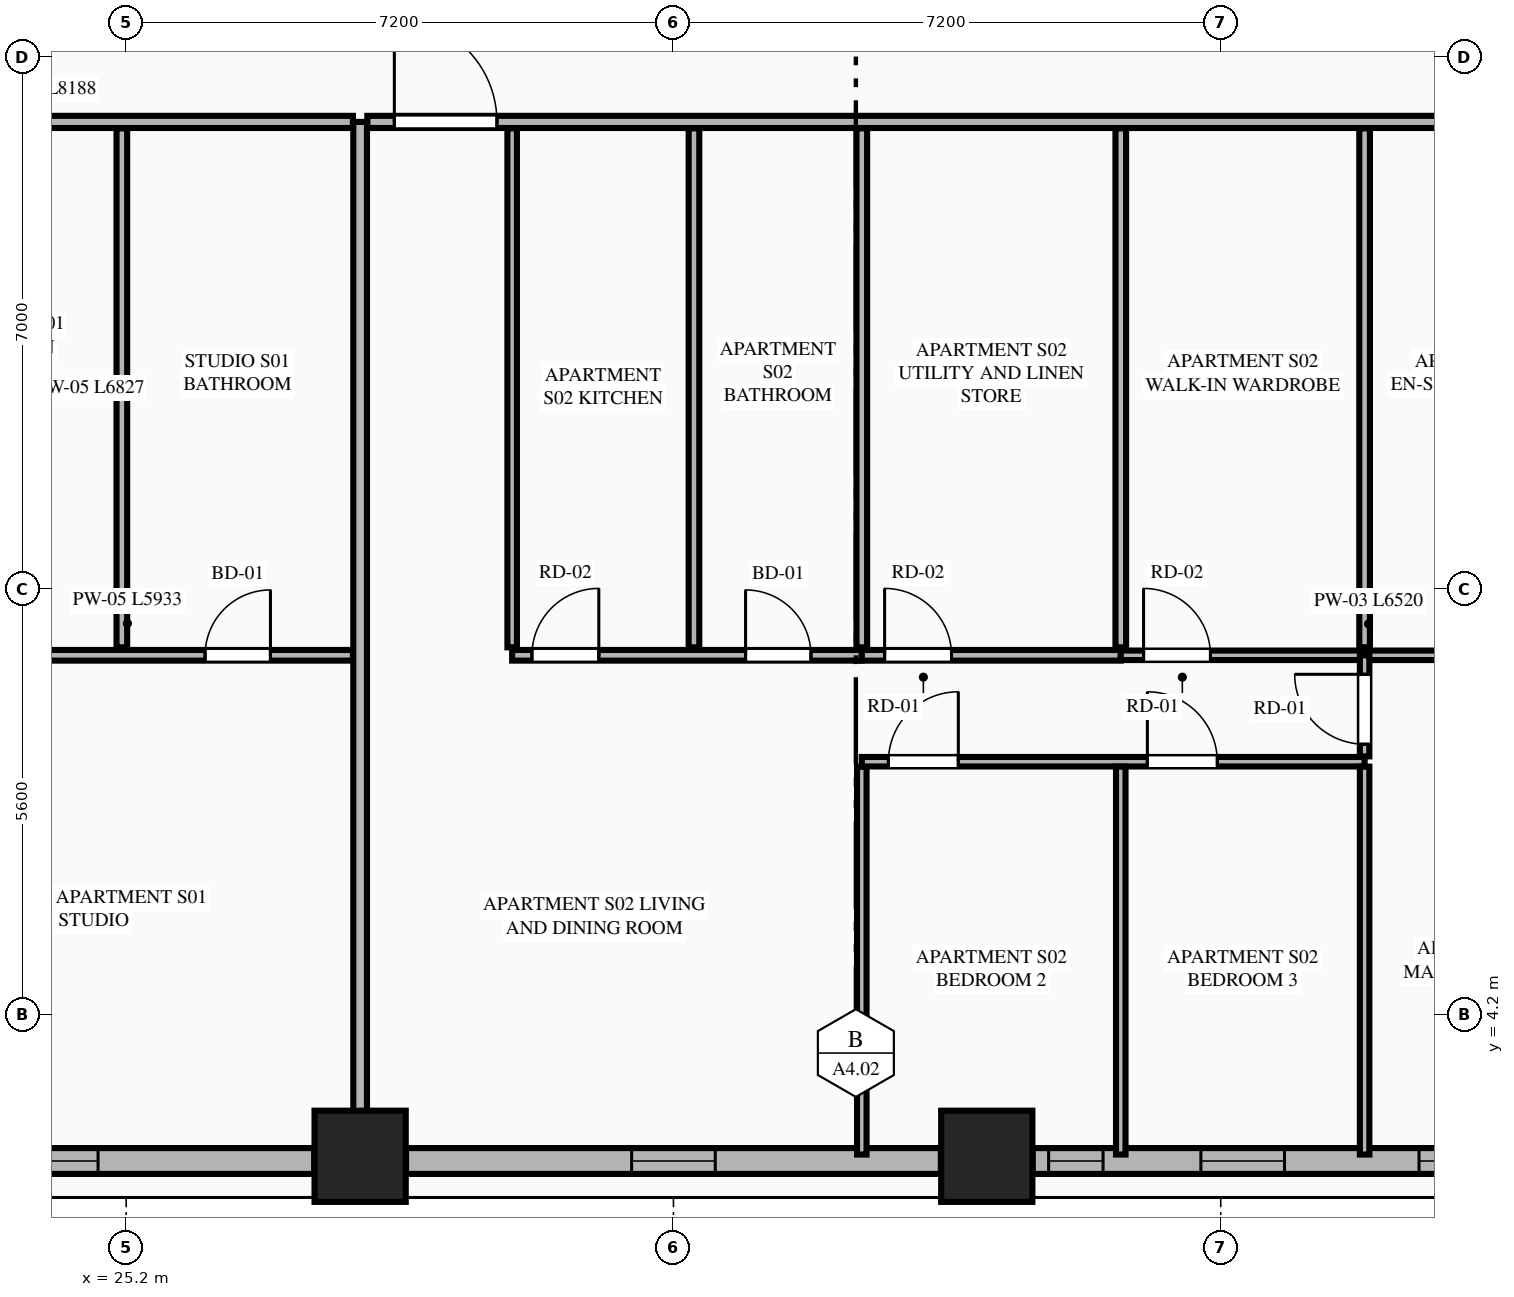
"""IFC4 building model, lengths in metres.
Left out: names, types, materials, properties, quantities, classifications, styles, units other than length and angle.
Written with IfcOpenShell. Run it as: python <this file> out.ifc"""

import sys

from ifc_helpers import new_model, si_unit, direction, frame, frame_2d, origin, origin_2d, place, context, subcontext, project, spatial, rectangle, extrude, element, fill, save


model = new_model("IFC4")
c1 = context("Model", 3, precision=1e-05, world=origin(), true_north=direction((0.0, 1.0)))
c2 = subcontext(c1, "Body", "Model", "MODEL_VIEW")
j1 = project(units=[si_unit("LENGTHUNIT", "METRE"), si_unit("PLANEANGLEUNIT", "RADIAN")], contexts=[c1])
p1 = place(None, origin())
s1 = spatial("IfcSite", under=j1, at=p1, CompositionType="ELEMENT")
p2 = place(p1, origin())
s2 = spatial("IfcBuilding", under=s1, at=p2, CompositionType="ELEMENT")
p3 = place(p2, frame((0.0, 0.0, 35.55)))
s3 = spatial("IfcBuildingStorey", under=s2, at=p3, CompositionType="ELEMENT", Elevation=35.55)
for number, where, z_axis, x_axis in (
    (1, (28.278, 2.342, 0.0), (0.0, 0.0, 1.0), (1.0, 0.0, 0.0)),
    (2, (36.522, 2.342, 0.0), (0.0, 0.0, 1.0), (1.0, 0.0, 0.0)),
):
    element("IfcColumn", number, at=place(p3, frame(where, z_axis=z_axis, x_axis=x_axis)), inside=s3, PredefinedType="COLUMN", context=c2, shape_type="SweptSolid", body=[
        extrude(rectangle(XDim=1.2, YDim=1.2, at=origin_2d()), origin(), (0.0, 0.0, 1.0), 3.55),
    ])
p4 = place(p3, frame((20.887, 2.28, 0.0), z_axis=(0.0, 0.0, 1.0), x_axis=(1.0, 0.0, 0.0)))
e3 = element("IfcWall", 3, at=p4, inside=s3, PredefinedType="STANDARD", context=c2, shape_type="SweptSolid", body=[
    extrude(rectangle(XDim=6.787, YDim=0.34, at=frame_2d((3.394, 0.0))), origin(), (0.0, 0.0, 1.0), 2.787),
])
p5 = place(p4, frame((2.843, 0.0, 0.75)))
e4 = element("IfcOpeningElement", 4, at=p5, cuts=e3, PredefinedType="OPENING", context=c2, shape_type="SweptSolid", body=[
    extrude(rectangle(XDim=1.1, YDim=1.887, at=frame_2d((0.55, 0.943))), frame((0.0, 0.18, 0.0), z_axis=(0.0, -1.0, 0.0), x_axis=(1.0, 0.0, 0.0)), (0.0, 0.0, 1.0), 0.36),
])
p6 = place(p3, frame((28.882, 2.28, 0.0), z_axis=(0.0, 0.0, 1.0), x_axis=(1.0, 0.0, 0.0)))
e5 = element("IfcWall", 5, at=p6, inside=s3, PredefinedType="STANDARD", context=c2, shape_type="SweptSolid", body=[
    extrude(rectangle(XDim=7.036, YDim=0.34, at=frame_2d((3.518, 0.0))), origin(), (0.0, 0.0, 1.0), 2.787),
])
p7 = place(p6, frame((2.968, 0.0, 0.75)))
e6 = element("IfcOpeningElement", 6, at=p7, cuts=e5, PredefinedType="OPENING", context=c2, shape_type="SweptSolid", body=[
    extrude(rectangle(XDim=1.1, YDim=1.887, at=frame_2d((0.55, 0.943))), frame((0.0, 0.18, 0.0), z_axis=(0.0, -1.0, 0.0), x_axis=(1.0, 0.0, 0.0)), (0.0, 0.0, 1.0), 0.36),
])
p8 = place(p3, frame((37.126, 2.28, 0.0), z_axis=(0.0, 0.0, 1.0), x_axis=(1.0, 0.0, 0.0)))
e7 = element("IfcWall", 7, at=p8, inside=s3, PredefinedType="STANDARD", context=c2, shape_type="SweptSolid", body=[
    extrude(rectangle(XDim=6.787, YDim=0.34, at=frame_2d((3.394, 0.0))), origin(), (0.0, 0.0, 1.0), 2.787),
])
p9 = place(p8, frame((2.213, 0.0, 0.75)))
e8 = element("IfcOpeningElement", 8, at=p9, cuts=e7, PredefinedType="OPENING", context=c2, shape_type="SweptSolid", body=[
    extrude(rectangle(XDim=1.1, YDim=1.887, at=frame_2d((0.55, 0.943))), frame((0.0, 0.18, 0.0), z_axis=(0.0, -1.0, 0.0), x_axis=(1.0, 0.0, 0.0)), (0.0, 0.0, 1.0), 0.36),
])
p10 = place(p8, frame((5.083, 0.0, 0.75)))
e9 = element("IfcOpeningElement", 9, at=p10, cuts=e7, PredefinedType="OPENING", context=c2, shape_type="SweptSolid", body=[
    extrude(rectangle(XDim=1.1, YDim=1.887, at=frame_2d((0.55, 0.943))), frame((0.0, 0.18, 0.0), z_axis=(0.0, -1.0, 0.0), x_axis=(1.0, 0.0, 0.0)), (0.0, 0.0, 1.0), 0.36),
])
p11 = place(p8, frame((0.21, 0.0, 0.75)))
e10 = element("IfcOpeningElement", 10, at=p11, cuts=e7, PredefinedType="OPENING", context=c2, shape_type="SweptSolid", body=[
    extrude(rectangle(XDim=0.716, YDim=1.887, at=frame_2d((0.358, 0.943))), frame((0.0, 0.18, 0.0), z_axis=(0.0, -1.0, 0.0), x_axis=(1.0, 0.0, 0.0)), (0.0, 0.0, 1.0), 0.36),
])
p12 = place(p3, frame((28.278, 2.455, 0.0), z_axis=(0.0, 0.0, 1.0), x_axis=(0.0, 1.0, 0.0)))
e11 = element("IfcWall", 11, at=p12, inside=s3, PredefinedType="PARTITIONING", context=c2, shape_type="SweptSolid", body=[
    extrude(rectangle(XDim=13.495, YDim=0.18, at=frame_2d((6.748, 0.0))), origin(), (0.0, 0.0, 1.0), 2.7),
])
p13 = place(p3, frame((19.995, 15.95, 0.0), z_axis=(0.0, 0.0, 1.0), x_axis=(1.0, 0.0, 0.0)))
e12 = element("IfcWall", 12, at=p13, inside=s3, PredefinedType="PARTITIONING", context=c2, shape_type="SweptSolid", body=[
    extrude(rectangle(XDim=8.188, YDim=0.16, at=frame_2d((4.094, 0.0))), origin(), (0.0, 0.0, 1.0), 3.33),
])
p14 = place(p13, frame((0.705, 0.0, 0.0)))
e13 = element("IfcOpeningElement", 13, at=p14, cuts=e12, PredefinedType="OPENING", context=c2, shape_type="SweptSolid", body=[
    extrude(rectangle(XDim=1.02, YDim=2.25, at=frame_2d((0.51, 1.125))), frame((0.0, 0.09, 0.0), z_axis=(0.0, -1.0, 0.0), x_axis=(1.0, 0.0, 0.0)), (0.0, 0.0, 1.0), 0.18),
])
p15 = place(p3, frame((22.25, 8.933, 0.0), z_axis=(0.0, 0.0, 1.0), x_axis=(1.0, 0.0, 0.0)))
e14 = element("IfcWall", 14, at=p15, inside=s3, PredefinedType="PLUMBINGWALL", context=c2, shape_type="SweptSolid", body=[
    extrude(rectangle(XDim=5.933, YDim=0.14, at=frame_2d((2.967, 0.0))), origin(), (0.0, 0.0, 1.0), 3.33),
])
p16 = place(p15, frame((3.988, 0.0, 0.0)))
e15 = element("IfcOpeningElement", 15, at=p16, cuts=e14, PredefinedType="OPENING", context=c2, shape_type="SweptSolid", body=[
    extrude(rectangle(XDim=0.86, YDim=2.1, at=frame_2d((0.43, 1.05))), frame((0.0, 0.08, 0.0), z_axis=(0.0, -1.0, 0.0), x_axis=(1.0, 0.0, 0.0)), (0.0, 0.0, 1.0), 0.16),
])
p17 = place(p15, frame((0.22, 0.0, 0.0)))
e16 = element("IfcOpeningElement", 16, at=p17, cuts=e14, PredefinedType="OPENING", context=c2, shape_type="SweptSolid", body=[
    extrude(rectangle(XDim=0.88, YDim=2.15, at=frame_2d((0.44, 1.075))), frame((0.0, 0.08, 0.0), z_axis=(0.0, -1.0, 0.0), x_axis=(1.0, 0.0, 0.0)), (0.0, 0.0, 1.0), 0.16),
])
p18 = place(p3, frame((25.143, 9.038, 0.0), z_axis=(0.0, 0.0, 1.0), x_axis=(0.0, 1.0, 0.0)))
e17 = element("IfcWall", 17, at=p18, inside=s3, PredefinedType="PLUMBINGWALL", context=c2, shape_type="SweptSolid", body=[
    extrude(rectangle(XDim=6.827, YDim=0.14, at=frame_2d((3.414, 0.0))), origin(), (0.0, 0.0, 1.0), 3.33),
])
p19 = place(p3, frame((28.373, 15.95, 0.0), z_axis=(0.0, 0.0, 1.0), x_axis=(1.0, 0.0, 0.0)))
e18 = element("IfcWall", 18, at=p19, inside=s3, PredefinedType="PARTITIONING", context=c2, shape_type="SweptSolid", body=[
    extrude(rectangle(XDim=16.432, YDim=0.16, at=frame_2d((8.216, 0.0))), origin(), (0.0, 0.0, 1.0), 3.33),
])
p20 = place(p19, frame((0.355, 0.0, 0.0)))
e19 = element("IfcOpeningElement", 19, at=p20, cuts=e18, PredefinedType="OPENING", context=c2, shape_type="SweptSolid", body=[
    extrude(rectangle(XDim=1.35, YDim=2.35, at=frame_2d((0.675, 1.175))), frame((0.0, 0.09, 0.0), z_axis=(0.0, -1.0, 0.0), x_axis=(1.0, 0.0, 0.0)), (0.0, 0.0, 1.0), 0.18),
])
p21 = place(p3, frame((30.278, 9.038, 0.0), z_axis=(0.0, 0.0, 1.0), x_axis=(0.0, 1.0, 0.0)))
e20 = element("IfcWall", 20, at=p21, inside=s3, PredefinedType="PARTITIONING", context=c2, shape_type="SweptSolid", body=[
    extrude(rectangle(XDim=6.827, YDim=0.125, at=frame_2d((3.414, 0.0))), origin(), (0.0, 0.0, 1.0), 3.33),
])
p22 = place(p3, frame((30.278, 8.933, 0.0), z_axis=(0.0, 0.0, 1.0), x_axis=(1.0, 0.0, 0.0)))
e21 = element("IfcWall", 21, at=p22, inside=s3, PredefinedType="PLUMBINGWALL", context=c2, shape_type="SweptSolid", body=[
    extrude(rectangle(XDim=4.6, YDim=0.14, at=frame_2d((2.3, 0.0))), origin(), (0.0, 0.0, 1.0), 3.33),
])
p23 = place(p22, frame((3.071, 0.0, 0.0)))
e22 = element("IfcOpeningElement", 22, at=p23, cuts=e21, PredefinedType="OPENING", context=c2, shape_type="SweptSolid", body=[
    extrude(rectangle(XDim=0.86, YDim=2.1, at=frame_2d((0.43, 1.05))), frame((0.0, 0.08, 0.0), z_axis=(0.0, -1.0, 0.0), x_axis=(1.0, 0.0, 0.0)), (0.0, 0.0, 1.0), 0.16),
])
p24 = place(p22, frame((0.26, 0.0, 0.0)))
e23 = element("IfcOpeningElement", 23, at=p24, cuts=e21, PredefinedType="OPENING", context=c2, shape_type="SweptSolid", body=[
    extrude(rectangle(XDim=0.88, YDim=2.15, at=frame_2d((0.44, 1.075))), frame((0.0, 0.08, 0.0), z_axis=(0.0, -1.0, 0.0), x_axis=(1.0, 0.0, 0.0)), (0.0, 0.0, 1.0), 0.16),
])
p25 = place(p3, frame((34.878, 8.933, 0.0), z_axis=(0.0, 0.0, 1.0), x_axis=(1.0, 0.0, 0.0)))
e24 = element("IfcWall", 24, at=p25, inside=s3, PredefinedType="PLUMBINGWALL", context=c2, shape_type="SweptSolid", body=[
    extrude(rectangle(XDim=3.407, YDim=0.14, at=frame_2d((1.704, 0.0))), origin(), (0.0, 0.0, 1.0), 3.33),
])
p26 = place(p25, frame((0.3, 0.0, 0.0)))
e25 = element("IfcOpeningElement", 25, at=p26, cuts=e24, PredefinedType="OPENING", context=c2, shape_type="SweptSolid", body=[
    extrude(rectangle(XDim=0.88, YDim=2.15, at=frame_2d((0.44, 1.075))), frame((0.0, 0.08, 0.0), z_axis=(0.0, -1.0, 0.0), x_axis=(1.0, 0.0, 0.0)), (0.0, 0.0, 1.0), 0.16),
])
p27 = place(p3, frame((38.285, 8.933, 0.0), z_axis=(0.0, 0.0, 1.0), x_axis=(1.0, 0.0, 0.0)))
e26 = element("IfcWall", 26, at=p27, inside=s3, PredefinedType="PARTITIONING", context=c2, shape_type="SweptSolid", body=[
    extrude(rectangle(XDim=6.52, YDim=0.125, at=frame_2d((3.26, 0.0))), origin(), (0.0, 0.0, 1.0), 3.33),
])
p28 = place(p27, frame((4.439, 0.0, 0.0)))
e27 = element("IfcOpeningElement", 27, at=p28, cuts=e26, PredefinedType="OPENING", context=c2, shape_type="SweptSolid", body=[
    extrude(rectangle(XDim=0.86, YDim=2.1, at=frame_2d((0.43, 1.05))), frame((0.0, 0.073, 0.0), z_axis=(0.0, -1.0, 0.0), x_axis=(1.0, 0.0, 0.0)), (0.0, 0.0, 1.0), 0.145),
])
p29 = place(p27, frame((0.3, 0.0, 0.0)))
e28 = element("IfcOpeningElement", 28, at=p29, cuts=e26, PredefinedType="OPENING", context=c2, shape_type="SweptSolid", body=[
    extrude(rectangle(XDim=0.88, YDim=2.15, at=frame_2d((0.44, 1.075))), frame((0.0, 0.073, 0.0), z_axis=(0.0, -1.0, 0.0), x_axis=(1.0, 0.0, 0.0)), (0.0, 0.0, 1.0), 0.145),
])
p30 = place(p3, frame((32.67, 9.038, 0.0), z_axis=(0.0, 0.0, 1.0), x_axis=(0.0, 1.0, 0.0)))
e29 = element("IfcWall", 29, at=p30, inside=s3, PredefinedType="PLUMBINGWALL", context=c2, shape_type="SweptSolid", body=[
    extrude(rectangle(XDim=6.827, YDim=0.14, at=frame_2d((3.414, 0.0))), origin(), (0.0, 0.0, 1.0), 3.33),
])
p31 = place(p3, frame((34.878, 2.365, 0.0), z_axis=(0.0, 0.0, 1.0), x_axis=(0.0, 1.0, 0.0)))
e30 = element("IfcWall", 30, at=p31, inside=s3, PredefinedType="PARTITIONING", context=c2, shape_type="SweptSolid", body=[
    extrude(rectangle(XDim=5.103, YDim=0.125, at=frame_2d((2.552, 0.0))), origin(), (0.0, 0.0, 1.0), 3.33),
])
p32 = place(p3, frame((34.878, 7.533, 0.0), z_axis=(0.0, 0.0, 1.0), x_axis=(1.0, 0.0, 0.0)))
e31 = element("IfcWall", 31, at=p32, inside=s3, PredefinedType="PARTITIONING", context=c2, shape_type="SweptSolid", body=[
    extrude(rectangle(XDim=6.615, YDim=0.125, at=frame_2d((3.308, 0.0))), origin(), (0.0, 0.0, 1.0), 3.33),
])
p33 = place(p32, frame((0.35, 0.0, 0.0)))
e32 = element("IfcOpeningElement", 32, at=p33, cuts=e31, PredefinedType="OPENING", context=c2, shape_type="SweptSolid", body=[
    extrude(rectangle(XDim=0.92, YDim=2.15, at=frame_2d((0.46, 1.075))), frame((0.0, 0.073, 0.0), z_axis=(0.0, -1.0, 0.0), x_axis=(1.0, 0.0, 0.0)), (0.0, 0.0, 1.0), 0.145),
])
p34 = place(p32, frame((3.757, 0.0, 0.0)))
e33 = element("IfcOpeningElement", 33, at=p34, cuts=e31, PredefinedType="OPENING", context=c2, shape_type="SweptSolid", body=[
    extrude(rectangle(XDim=0.92, YDim=2.15, at=frame_2d((0.46, 1.075))), frame((0.0, 0.073, 0.0), z_axis=(0.0, -1.0, 0.0), x_axis=(1.0, 0.0, 0.0)), (0.0, 0.0, 1.0), 0.145),
])
p35 = place(p3, frame((41.493, 7.603, 0.0), z_axis=(0.0, 0.0, 1.0), x_axis=(0.0, 1.0, 0.0)))
e34 = element("IfcWall", 34, at=p35, inside=s3, PredefinedType="PARTITIONING", context=c2, shape_type="SweptSolid", body=[
    extrude(rectangle(XDim=1.33, YDim=0.125, at=frame_2d((0.665, 0.0))), origin(), (0.0, 0.0, 1.0), 3.33),
])
p36 = place(p35, frame((0.16, 0.0, 0.0)))
e35 = element("IfcOpeningElement", 35, at=p36, cuts=e34, PredefinedType="OPENING", context=c2, shape_type="SweptSolid", body=[
    extrude(rectangle(XDim=0.92, YDim=2.15, at=frame_2d((0.46, 1.075))), frame((0.0, 0.073, 0.0), z_axis=(0.0, -1.0, 0.0), x_axis=(1.0, 0.0, 0.0)), (0.0, 0.0, 1.0), 0.145),
])
for number, where, z_axis, x_axis in (
    (36, (34.878, 9.038, 0.0), (0.0, 0.0, 1.0), (0.0, 1.0, 0.0)),
    (37, (38.285, 9.038, 0.0), (0.0, 0.0, 1.0), (0.0, 1.0, 0.0)),
):
    element("IfcWall", number, at=place(p3, frame(where, z_axis=z_axis, x_axis=x_axis)), inside=s3, PredefinedType="PLUMBINGWALL", context=c2, shape_type="SweptSolid", body=[
        extrude(rectangle(XDim=6.827, YDim=0.14, at=frame_2d((3.414, 0.0))), origin(), (0.0, 0.0, 1.0), 3.33),
    ])
for number, where, z_axis, x_axis in (
    (38, (38.285, 2.365, 0.0), (0.0, 0.0, 1.0), (0.0, 1.0, 0.0)),
    (39, (41.493, 2.365, 0.0), (0.0, 0.0, 1.0), (0.0, 1.0, 0.0)),
):
    element("IfcWall", number, at=place(p3, frame(where, z_axis=z_axis, x_axis=x_axis)), inside=s3, PredefinedType="PARTITIONING", context=c2, shape_type="SweptSolid", body=[
        extrude(rectangle(XDim=5.103, YDim=0.125, at=frame_2d((2.552, 0.0))), origin(), (0.0, 0.0, 1.0), 3.33),
    ])
p37 = place(p3, frame((41.493, 9.038, 0.0), z_axis=(0.0, 0.0, 1.0), x_axis=(0.0, 1.0, 0.0)))
e40 = element("IfcWall", 40, at=p37, inside=s3, PredefinedType="PLUMBINGWALL", context=c2, shape_type="SweptSolid", body=[
    extrude(rectangle(XDim=6.827, YDim=0.14, at=frame_2d((3.414, 0.0))), origin(), (0.0, 0.0, 1.0), 3.33),
])
p38 = place(p5, origin())
e41 = element("IfcWindow", 41, at=p38, inside=s3, PartitioningType="SINGLE_PANEL", PredefinedType="WINDOW", context=c2, shape_type="SweptSolid", body=[
    extrude(rectangle(XDim=1.1, YDim=1.887, at=frame_2d((0.55, 0.943))), frame((0.0, 0.03, 0.0), z_axis=(0.0, -1.0, 0.0), x_axis=(1.0, 0.0, 0.0)), (0.0, 0.0, 1.0), 0.06),
])
fill(e4, e41)
p39 = place(p7, origin())
e42 = element("IfcWindow", 42, at=p39, inside=s3, PartitioningType="SINGLE_PANEL", PredefinedType="WINDOW", context=c2, shape_type="SweptSolid", body=[
    extrude(rectangle(XDim=1.1, YDim=1.887, at=frame_2d((0.55, 0.943))), frame((0.0, 0.03, 0.0), z_axis=(0.0, -1.0, 0.0), x_axis=(1.0, 0.0, 0.0)), (0.0, 0.0, 1.0), 0.06),
])
fill(e6, e42)
p40 = place(p9, origin())
e43 = element("IfcWindow", 43, at=p40, inside=s3, PartitioningType="SINGLE_PANEL", PredefinedType="WINDOW", context=c2, shape_type="SweptSolid", body=[
    extrude(rectangle(XDim=1.1, YDim=1.887, at=frame_2d((0.55, 0.943))), frame((0.0, 0.03, 0.0), z_axis=(0.0, -1.0, 0.0), x_axis=(1.0, 0.0, 0.0)), (0.0, 0.0, 1.0), 0.06),
])
fill(e8, e43)
p41 = place(p16, origin())
e44 = element("IfcDoor", 44, at=p41, inside=s3, OperationType="SINGLE_SWING_RIGHT", PredefinedType="DOOR", context=c2, shape_type="SweptSolid", body=[
    extrude(rectangle(XDim=0.86, YDim=2.1, at=frame_2d((0.43, 1.05))), frame((0.0, 0.025, 0.0), z_axis=(0.0, -1.0, 0.0), x_axis=(1.0, 0.0, 0.0)), (0.0, 0.0, 1.0), 0.05),
])
fill(e15, e44)
p42 = place(p23, origin())
e45 = element("IfcDoor", 45, at=p42, inside=s3, OperationType="SINGLE_SWING_LEFT", PredefinedType="DOOR", context=c2, shape_type="SweptSolid", body=[
    extrude(rectangle(XDim=0.86, YDim=2.1, at=frame_2d((0.43, 1.05))), frame((0.0, 0.025, 0.0), z_axis=(0.0, -1.0, 0.0), x_axis=(1.0, 0.0, 0.0)), (0.0, 0.0, 1.0), 0.05),
])
fill(e22, e45)
p43 = place(p20, origin())
e46 = element("IfcDoor", 46, at=p43, inside=s3, OperationType="SINGLE_SWING_LEFT", PredefinedType="DOOR", context=c2, shape_type="SweptSolid", body=[
    extrude(rectangle(XDim=1.35, YDim=2.35, at=frame_2d((0.675, 1.175))), frame((0.0, 0.025, 0.0), z_axis=(0.0, -1.0, 0.0), x_axis=(1.0, 0.0, 0.0)), (0.0, 0.0, 1.0), 0.05),
])
fill(e19, e46)
p44 = place(p24, origin())
e47 = element("IfcDoor", 47, at=p44, inside=s3, OperationType="SINGLE_SWING_RIGHT", PredefinedType="DOOR", context=c2, shape_type="SweptSolid", body=[
    extrude(rectangle(XDim=0.88, YDim=2.15, at=frame_2d((0.44, 1.075))), frame((0.0, 0.025, 0.0), z_axis=(0.0, -1.0, 0.0), x_axis=(1.0, 0.0, 0.0)), (0.0, 0.0, 1.0), 0.05),
])
fill(e23, e47)
p45 = place(p26, origin())
e48 = element("IfcDoor", 48, at=p45, inside=s3, OperationType="SINGLE_SWING_LEFT", PredefinedType="DOOR", context=c2, shape_type="SweptSolid", body=[
    extrude(rectangle(XDim=0.88, YDim=2.15, at=frame_2d((0.44, 1.075))), frame((0.0, 0.025, 0.0), z_axis=(0.0, -1.0, 0.0), x_axis=(1.0, 0.0, 0.0)), (0.0, 0.0, 1.0), 0.05),
])
fill(e25, e48)
p46 = place(p33, origin())
e49 = element("IfcDoor", 49, at=p46, inside=s3, OperationType="SINGLE_SWING_RIGHT", PredefinedType="DOOR", context=c2, shape_type="SweptSolid", body=[
    extrude(rectangle(XDim=0.92, YDim=2.15, at=frame_2d((0.46, 1.075))), frame((0.0, 0.025, 0.0), z_axis=(0.0, -1.0, 0.0), x_axis=(1.0, 0.0, 0.0)), (0.0, 0.0, 1.0), 0.05),
])
fill(e32, e49)
p47 = place(p34, origin())
e50 = element("IfcDoor", 50, at=p47, inside=s3, OperationType="SINGLE_SWING_LEFT", PredefinedType="DOOR", context=c2, shape_type="SweptSolid", body=[
    extrude(rectangle(XDim=0.92, YDim=2.15, at=frame_2d((0.46, 1.075))), frame((0.0, 0.025, 0.0), z_axis=(0.0, -1.0, 0.0), x_axis=(1.0, 0.0, 0.0)), (0.0, 0.0, 1.0), 0.05),
])
fill(e33, e50)
p48 = place(p36, origin())
e51 = element("IfcDoor", 51, at=p48, inside=s3, OperationType="SINGLE_SWING_RIGHT", PredefinedType="DOOR", context=c2, shape_type="SweptSolid", body=[
    extrude(rectangle(XDim=0.92, YDim=2.15, at=frame_2d((0.46, 1.075))), frame((0.0, 0.025, 0.0), z_axis=(0.0, -1.0, 0.0), x_axis=(1.0, 0.0, 0.0)), (0.0, 0.0, 1.0), 0.05),
])
fill(e35, e51)
p49 = place(p29, origin())
e52 = element("IfcDoor", 52, at=p49, inside=s3, OperationType="SINGLE_SWING_LEFT", PredefinedType="DOOR", context=c2, shape_type="SweptSolid", body=[
    extrude(rectangle(XDim=0.88, YDim=2.15, at=frame_2d((0.44, 1.075))), frame((0.0, 0.025, 0.0), z_axis=(0.0, -1.0, 0.0), x_axis=(1.0, 0.0, 0.0)), (0.0, 0.0, 1.0), 0.05),
])
fill(e28, e52)
p50 = place(p10, origin())
e53 = element("IfcWindow", 53, at=p50, inside=s3, PartitioningType="SINGLE_PANEL", PredefinedType="WINDOW", context=c2, shape_type="SweptSolid", body=[
    extrude(rectangle(XDim=1.1, YDim=1.887, at=frame_2d((0.55, 0.943))), frame((0.0, 0.03, 0.0), z_axis=(0.0, -1.0, 0.0), x_axis=(1.0, 0.0, 0.0)), (0.0, 0.0, 1.0), 0.06),
])
fill(e9, e53)
p51 = place(p11, origin())
e54 = element("IfcWindow", 54, at=p51, inside=s3, PartitioningType="SINGLE_PANEL", PredefinedType="WINDOW", context=c2, shape_type="SweptSolid", body=[
    extrude(rectangle(XDim=0.716, YDim=1.887, at=frame_2d((0.358, 0.943))), frame((0.0, 0.03, 0.0), z_axis=(0.0, -1.0, 0.0), x_axis=(1.0, 0.0, 0.0)), (0.0, 0.0, 1.0), 0.06),
])
fill(e10, e54)
save(model, sys.argv[1])
